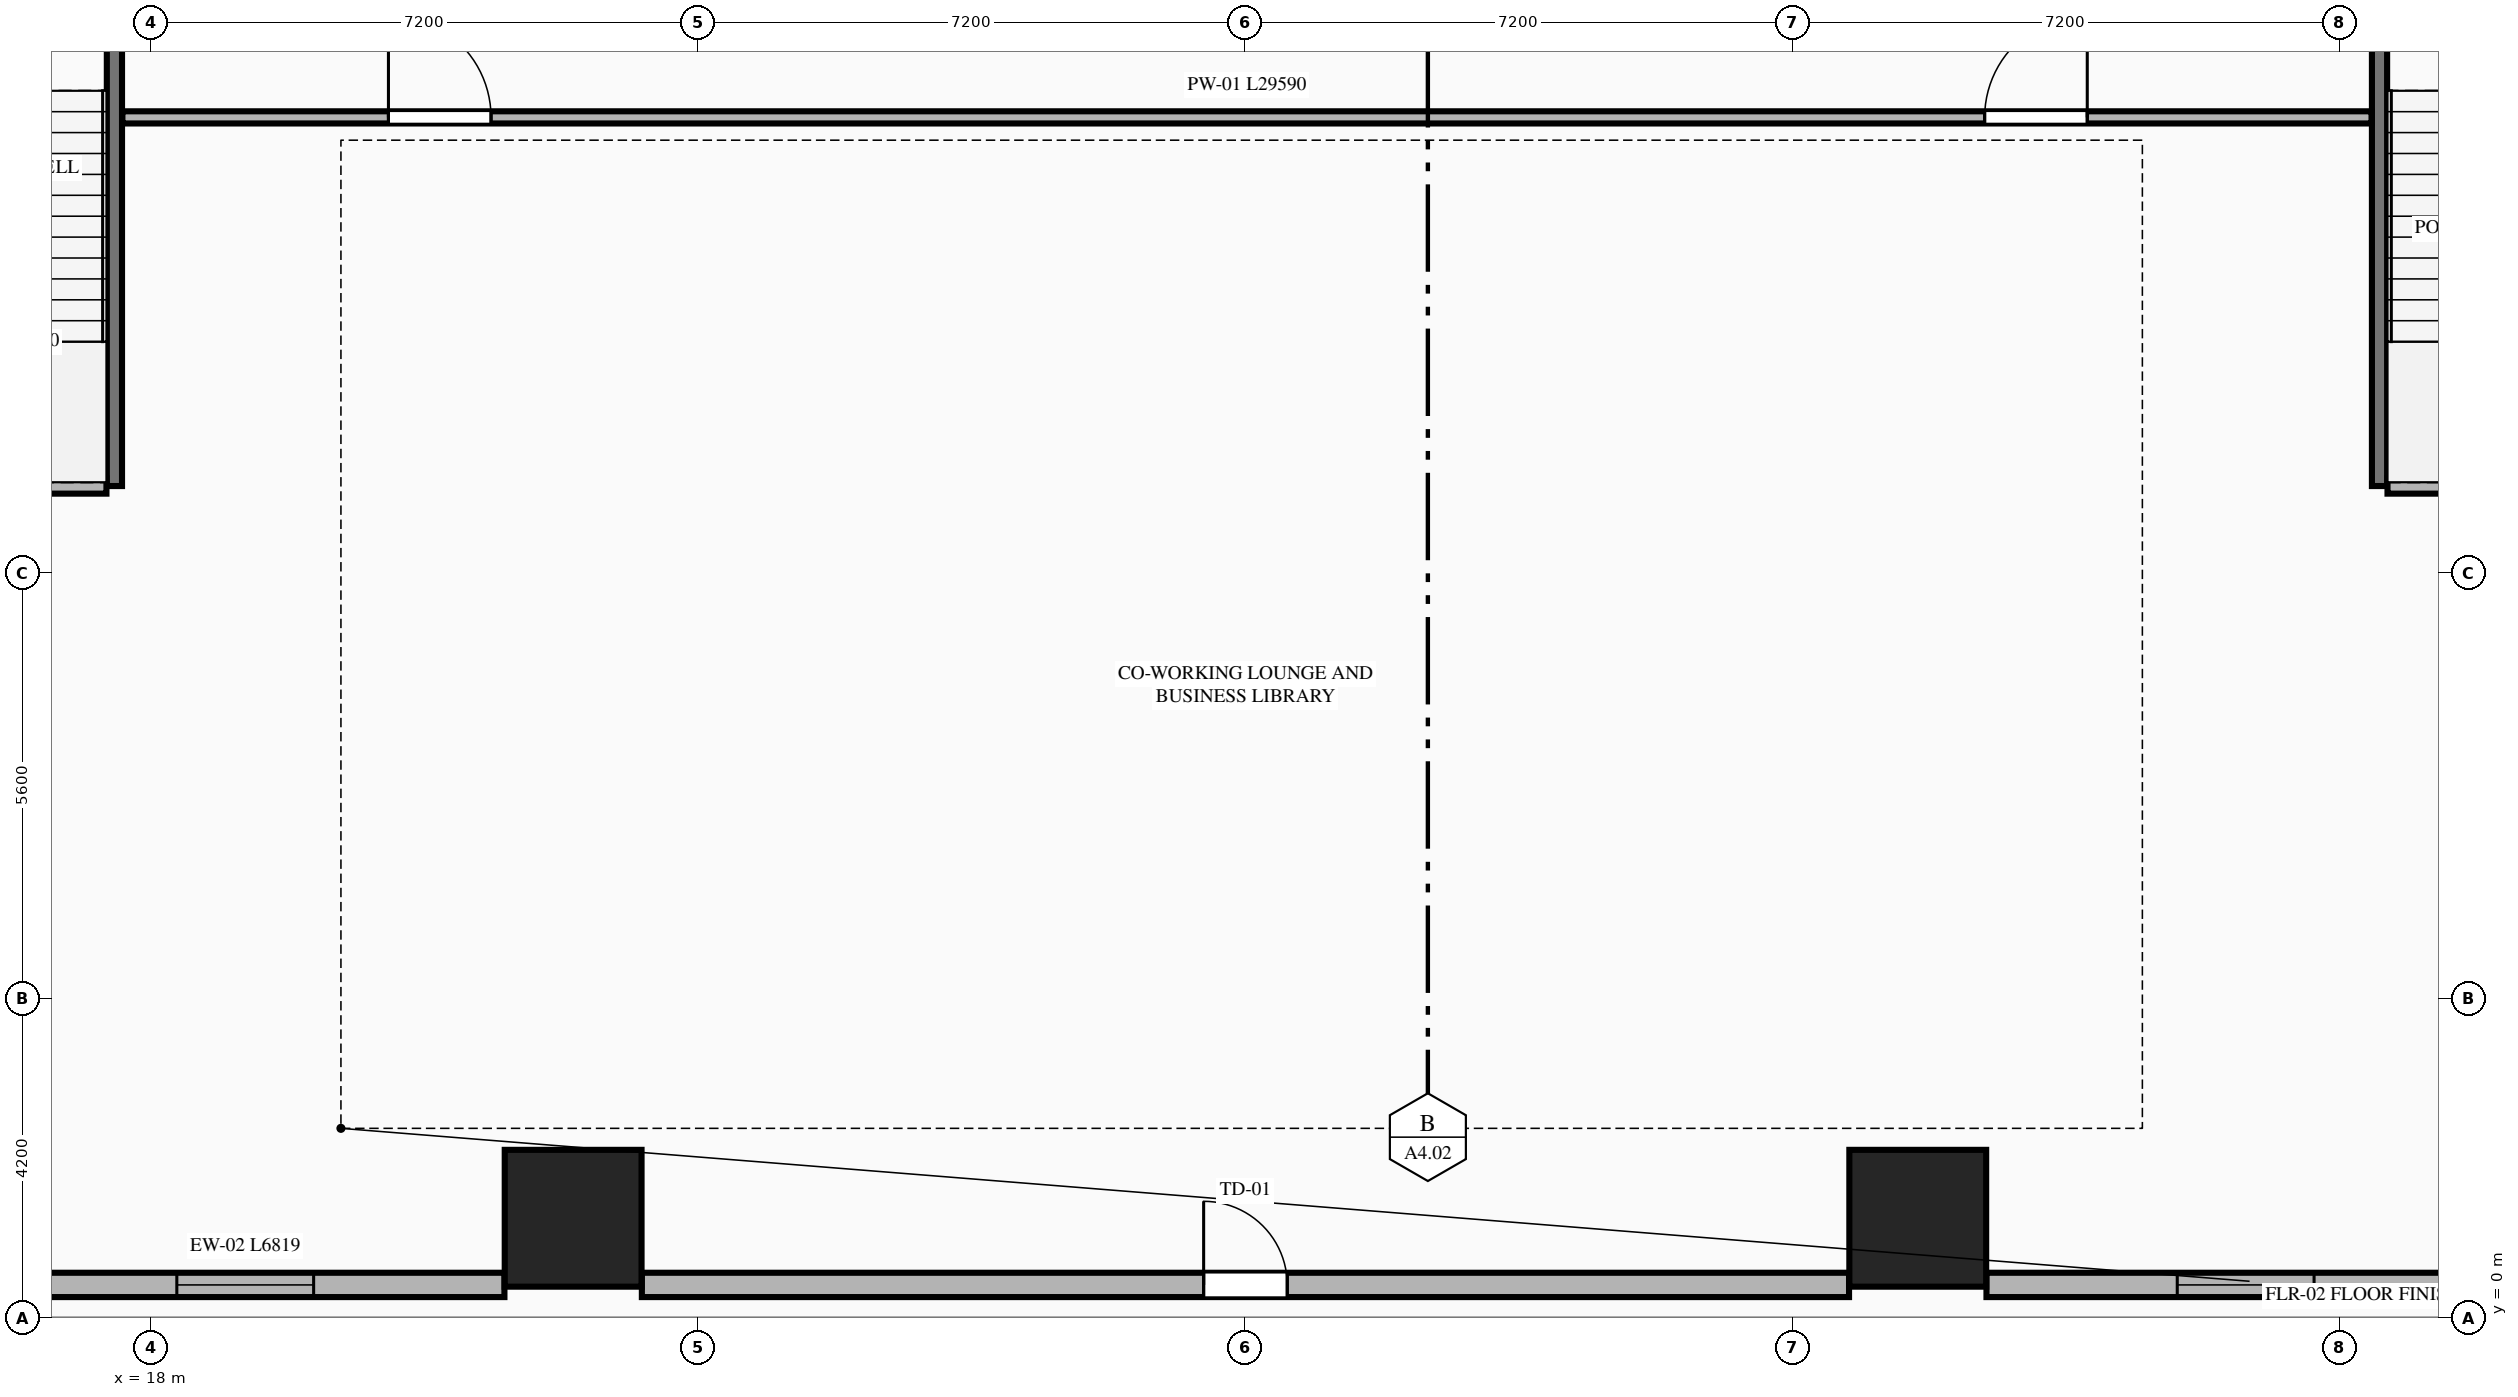
"""IFC4 building model, lengths in metres.
Left out: names, types, materials, properties, quantities, classifications, styles, units other than length and angle.
Written with IfcOpenShell. Run it as: python <this file> out.ifc"""

import sys

from ifc_helpers import new_model, si_unit, direction, frame, frame_2d, origin, origin_2d, place, context, subcontext, project, spatial, rectangle, extrude, element, fill, save


model = new_model("IFC4")
c1 = context("Model", 3, precision=1e-05, world=origin(), true_north=direction((0.0, 1.0)))
c2 = subcontext(c1, "Body", "Model", "MODEL_VIEW")
j1 = project(units=[si_unit("LENGTHUNIT", "METRE"), si_unit("PLANEANGLEUNIT", "RADIAN")], contexts=[c1])
p1 = place(None, origin())
s1 = spatial("IfcSite", under=j1, at=p1, CompositionType="ELEMENT")
p2 = place(p1, origin())
s2 = spatial("IfcBuilding", under=s1, at=p2, CompositionType="ELEMENT")
p3 = place(p2, frame((0.0, 0.0, 6.0)))
s3 = spatial("IfcBuildingStorey", under=s2, at=p3, CompositionType="ELEMENT", Elevation=6.0)
for number, where, z_axis, x_axis in (
    (1, (23.555, 1.317, 0.0), (0.0, 0.0, 1.0), (1.0, 0.0, 0.0)),
    (2, (41.245, 1.317, 0.0), (0.0, 0.0, 1.0), (1.0, 0.0, 0.0)),
):
    element("IfcColumn", number, at=place(p3, frame(where, z_axis=z_axis, x_axis=x_axis)), inside=s3, PredefinedType="COLUMN", context=c2, shape_type="SweptSolid", body=[
        extrude(rectangle(XDim=1.8, YDim=1.8, at=origin_2d()), origin(), (0.0, 0.0, 1.0), 4.5),
    ])
p4 = place(p3, frame((17.52, 10.95, 0.0), z_axis=(0.0, 0.0, 1.0), x_axis=(0.0, 1.0, 0.0)))
e3 = element("IfcWall", 3, at=p4, inside=s3, PredefinedType="SHEAR", context=c2, shape_type="SweptSolid", body=[
    extrude(rectangle(XDim=6.85, YDim=0.2, at=frame_2d((3.425, 0.0))), origin(), (0.0, 0.0, 1.0), 4.5),
])
p5 = place(p3, frame((14.225, 10.95, 0.0), z_axis=(0.0, 0.0, 1.0), x_axis=(1.0, 0.0, 0.0)))
e4 = element("IfcWall", 4, at=p5, inside=s3, PredefinedType="PLUMBINGWALL", context=c2, shape_type="SweptSolid", body=[
    extrude(rectangle(XDim=3.19, YDim=0.2, at=frame_2d((1.595, 0.0))), origin(), (0.0, 0.0, 1.0), 4.25),
])
p6 = place(p3, frame((47.32, 10.95, 0.0), z_axis=(0.0, 0.0, 1.0), x_axis=(0.0, 1.0, 0.0)))
e5 = element("IfcWall", 5, at=p6, inside=s3, PredefinedType="SHEAR", context=c2, shape_type="SweptSolid", body=[
    extrude(rectangle(XDim=6.85, YDim=0.2, at=frame_2d((3.425, 0.0))), origin(), (0.0, 0.0, 1.0), 4.5),
])
p7 = place(p3, frame((47.425, 10.95, 0.0), z_axis=(0.0, 0.0, 1.0), x_axis=(1.0, 0.0, 0.0)))
e6 = element("IfcWall", 6, at=p7, inside=s3, PredefinedType="PLUMBINGWALL", context=c2, shape_type="SweptSolid", body=[
    extrude(rectangle(XDim=3.19, YDim=0.2, at=frame_2d((1.595, 0.0))), origin(), (0.0, 0.0, 1.0), 4.25),
])
p8 = place(p3, frame((17.625, 15.8, 0.0), z_axis=(0.0, 0.0, 1.0), x_axis=(1.0, 0.0, 0.0)))
e7 = element("IfcWall", 7, at=p8, inside=s3, PredefinedType="PARTITIONING", context=c2, shape_type="SweptSolid", body=[
    extrude(rectangle(XDim=29.59, YDim=0.16, at=frame_2d((14.795, 0.0))), origin(), (0.0, 0.0, 1.0), 4.25),
])
p9 = place(p8, frame((3.5, 0.0, 0.0)))
e8 = element("IfcOpeningElement", 8, at=p9, cuts=e7, PredefinedType="OPENING", context=c2, shape_type="SweptSolid", body=[
    extrude(rectangle(XDim=1.35, YDim=2.35, at=frame_2d((0.675, 1.175))), frame((0.0, 0.09, 0.0), z_axis=(0.0, -1.0, 0.0), x_axis=(1.0, 0.0, 0.0)), (0.0, 0.0, 1.0), 0.18),
])
p10 = place(p8, frame((24.5, 0.0, 0.0)))
e9 = element("IfcOpeningElement", 9, at=p10, cuts=e7, PredefinedType="OPENING", context=c2, shape_type="SweptSolid", body=[
    extrude(rectangle(XDim=1.35, YDim=2.35, at=frame_2d((0.675, 1.175))), frame((0.0, 0.09, 0.0), z_axis=(0.0, -1.0, 0.0), x_axis=(1.0, 0.0, 0.0)), (0.0, 0.0, 1.0), 0.18),
])
p11 = place(p3, frame((15.832, 0.44, 0.0), z_axis=(0.0, 0.0, 1.0), x_axis=(1.0, 0.0, 0.0)))
e10 = element("IfcWall", 10, at=p11, inside=s3, PredefinedType="STANDARD", context=c2, shape_type="SweptSolid", body=[
    extrude(rectangle(XDim=6.819, YDim=0.32, at=frame_2d((3.409, 0.0))), origin(), (0.0, 0.0, 1.0), 4.25),
])
p12 = place(p11, frame((2.509, 0.0, 0.75)))
e11 = element("IfcOpeningElement", 11, at=p12, cuts=e10, PredefinedType="OPENING", context=c2, shape_type="SweptSolid", body=[
    extrude(rectangle(XDim=1.8, YDim=2.4, at=frame_2d((0.9, 1.2))), frame((0.0, 0.17, 0.0), z_axis=(0.0, -1.0, 0.0), x_axis=(1.0, 0.0, 0.0)), (0.0, 0.0, 1.0), 0.34),
])
p13 = place(p3, frame((24.459, 0.44, 0.0), z_axis=(0.0, 0.0, 1.0), x_axis=(1.0, 0.0, 0.0)))
e12 = element("IfcWall", 12, at=p13, inside=s3, PredefinedType="STANDARD", context=c2, shape_type="SweptSolid", body=[
    extrude(rectangle(XDim=15.882, YDim=0.32, at=frame_2d((7.941, 0.0))), origin(), (0.0, 0.0, 1.0), 4.25),
])
p14 = place(p13, frame((7.391, 0.0, 0.0)))
e13 = element("IfcOpeningElement", 13, at=p14, cuts=e12, PredefinedType="OPENING", context=c2, shape_type="SweptSolid", body=[
    extrude(rectangle(XDim=1.1, YDim=2.25, at=frame_2d((0.55, 1.125))), frame((0.0, 0.17, 0.0), z_axis=(0.0, -1.0, 0.0), x_axis=(1.0, 0.0, 0.0)), (0.0, 0.0, 1.0), 0.34),
])
p15 = place(p3, frame((42.149, 0.44, 0.0), z_axis=(0.0, 0.0, 1.0), x_axis=(1.0, 0.0, 0.0)))
e14 = element("IfcWall", 14, at=p15, inside=s3, PredefinedType="STANDARD", context=c2, shape_type="SweptSolid", body=[
    extrude(rectangle(XDim=6.819, YDim=0.32, at=frame_2d((3.41, 0.0))), origin(), (0.0, 0.0, 1.0), 4.25),
])
p16 = place(p15, frame((2.51, 0.0, 0.75)))
e15 = element("IfcOpeningElement", 15, at=p16, cuts=e14, PredefinedType="OPENING", context=c2, shape_type="SweptSolid", body=[
    extrude(rectangle(XDim=1.8, YDim=2.4, at=frame_2d((0.9, 1.2))), frame((0.0, 0.17, 0.0), z_axis=(0.0, -1.0, 0.0), x_axis=(1.0, 0.0, 0.0)), (0.0, 0.0, 1.0), 0.34),
])
p17 = place(p9, origin())
e16 = element("IfcDoor", 16, at=p17, inside=s3, OperationType="SINGLE_SWING_LEFT", PredefinedType="DOOR", context=c2, shape_type="SweptSolid", body=[
    extrude(rectangle(XDim=1.35, YDim=2.35, at=frame_2d((0.675, 1.175))), frame((0.0, 0.025, 0.0), z_axis=(0.0, -1.0, 0.0), x_axis=(1.0, 0.0, 0.0)), (0.0, 0.0, 1.0), 0.05),
])
fill(e8, e16)
p18 = place(p10, origin())
e17 = element("IfcDoor", 17, at=p18, inside=s3, OperationType="SINGLE_SWING_RIGHT", PredefinedType="DOOR", context=c2, shape_type="SweptSolid", body=[
    extrude(rectangle(XDim=1.35, YDim=2.35, at=frame_2d((0.675, 1.175))), frame((0.0, 0.025, 0.0), z_axis=(0.0, -1.0, 0.0), x_axis=(1.0, 0.0, 0.0)), (0.0, 0.0, 1.0), 0.05),
])
fill(e9, e17)
p19 = place(p12, origin())
e18 = element("IfcWindow", 18, at=p19, inside=s3, PartitioningType="SINGLE_PANEL", PredefinedType="WINDOW", context=c2, shape_type="SweptSolid", body=[
    extrude(rectangle(XDim=1.8, YDim=2.4, at=frame_2d((0.9, 1.2))), frame((0.0, 0.03, 0.0), z_axis=(0.0, -1.0, 0.0), x_axis=(1.0, 0.0, 0.0)), (0.0, 0.0, 1.0), 0.06),
])
fill(e11, e18)
p20 = place(p14, origin())
e19 = element("IfcDoor", 19, at=p20, inside=s3, OperationType="SINGLE_SWING_LEFT", PredefinedType="DOOR", context=c2, shape_type="SweptSolid", body=[
    extrude(rectangle(XDim=1.1, YDim=2.25, at=frame_2d((0.55, 1.125))), frame((0.0, 0.025, 0.0), z_axis=(0.0, -1.0, 0.0), x_axis=(1.0, 0.0, 0.0)), (0.0, 0.0, 1.0), 0.05),
])
fill(e13, e19)
p21 = place(p16, origin())
e20 = element("IfcWindow", 20, at=p21, inside=s3, PartitioningType="SINGLE_PANEL", PredefinedType="WINDOW", context=c2, shape_type="SweptSolid", body=[
    extrude(rectangle(XDim=1.8, YDim=2.4, at=frame_2d((0.9, 1.2))), frame((0.0, 0.03, 0.0), z_axis=(0.0, -1.0, 0.0), x_axis=(1.0, 0.0, 0.0)), (0.0, 0.0, 1.0), 0.06),
])
fill(e15, e20)
save(model, sys.argv[1])
